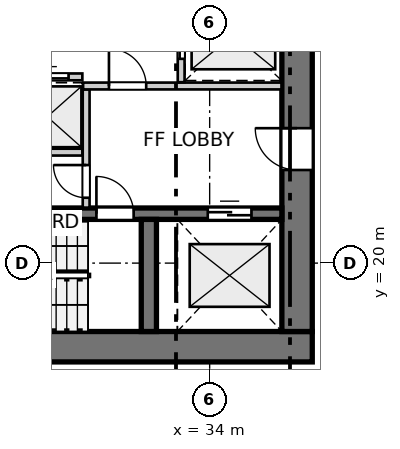
"""IFC4 building model, lengths in metres.
Left out: names, types, materials, properties, quantities, classifications, styles, units other than length and angle.
Written with IfcOpenShell. Run it as: python <this file> out.ifc"""

import sys

from ifc_helpers import new_model, si_unit, direction, frame, frame_2d, origin, place, context, subcontext, project, spatial, rectangle, extrude, source, transform, mapped, element, fill, save


model = new_model("IFC4")
c1 = context("Model", 3, precision=1e-05, world=origin(), true_north=direction((0.0, 1.0)))
c2 = subcontext(c1, "Body", "Model", "MODEL_VIEW")
j1 = project(units=[si_unit("LENGTHUNIT", "METRE"), si_unit("PLANEANGLEUNIT", "RADIAN")], contexts=[c1])
p1 = place(None, origin())
s1 = spatial("IfcSite", under=j1, at=p1, CompositionType="ELEMENT")
p2 = place(p1, origin())
s2 = spatial("IfcBuilding", under=s1, at=p2, CompositionType="ELEMENT")
p3 = place(p2, frame((0.0, 0.0, 27.0)))
s3 = spatial("IfcBuildingStorey", under=s2, at=p3, CompositionType="ELEMENT", Elevation=27.0)
p4 = place(p3, frame((24.0, 17.8, 0.0), z_axis=(0.0, 0.0, 1.0), x_axis=(1.0, 0.0, 0.0)))
e1 = element("IfcWall", 1, at=p4, inside=s3, PredefinedType="SHEAR", context=c2, shape_type="SweptSolid", body=[
    extrude(rectangle(XDim=12.7, YDim=0.8, at=frame_2d((6.35, 0.0))), origin(), (0.0, 0.0, 1.0), 2.935),
])
p5 = place(p3, frame((36.3, 18.2, 0.0), z_axis=(0.0, 0.0, 1.0), x_axis=(0.0, 1.0, 0.0)))
e2 = element("IfcWall", 2, at=p5, inside=s3, PredefinedType="SHEAR", context=c2, shape_type="SweptSolid", body=[
    extrude(rectangle(XDim=15.6, YDim=0.8, at=frame_2d((7.8, 0.0))), origin(), (0.0, 0.0, 1.0), 2.935),
])
p6 = place(p5, frame((4.25, 0.0, 0.0)))
e3 = element("IfcOpeningElement", 3, at=p6, cuts=e2, PredefinedType="OPENING", context=c2, shape_type="SweptSolid", body=[
    extrude(rectangle(XDim=1.1, YDim=2.15, at=frame_2d((0.55, 1.075))), frame((0.0, 0.41, 0.0), z_axis=(0.0, -1.0, 0.0), x_axis=(1.0, 0.0, 0.0)), (0.0, 0.0, 1.0), 0.82),
])
p7 = place(p5, frame((10.25, 0.0, 0.0)))
e4 = element("IfcOpeningElement", 4, at=p7, cuts=e2, PredefinedType="OPENING", context=c2, shape_type="SweptSolid", body=[
    extrude(rectangle(XDim=1.1, YDim=2.15, at=frame_2d((0.55, 1.075))), frame((0.0, 0.41, 0.0), z_axis=(0.0, -1.0, 0.0), x_axis=(1.0, 0.0, 0.0)), (0.0, 0.0, 1.0), 0.82),
])
p8 = place(p3, frame((24.8, 21.3, 0.0), z_axis=(0.0, 0.0, 1.0), x_axis=(1.0, 0.0, 0.0)))
e5 = element("IfcWall", 5, at=p8, inside=s3, PredefinedType="SHEAR", context=c2, shape_type="SweptSolid", body=[
    extrude(rectangle(XDim=11.1, YDim=0.3, at=frame_2d((5.55, 0.0))), origin(), (0.0, 0.0, 1.0), 2.935),
])
p9 = place(p8, frame((6.22, 0.0, 0.0)))
e6 = element("IfcOpeningElement", 6, at=p9, cuts=e5, PredefinedType="OPENING", context=c2, shape_type="SweptSolid", body=[
    extrude(rectangle(XDim=0.98, YDim=2.15, at=frame_2d((0.49, 1.075))), frame((0.0, 0.16, 0.0), z_axis=(0.0, -1.0, 0.0), x_axis=(1.0, 0.0, 0.0)), (0.0, 0.0, 1.0), 0.32),
])
p10 = place(p8, frame((9.15, 0.0, 0.0)))
e7 = element("IfcOpeningElement", 7, at=p10, cuts=e5, PredefinedType="OPENING", context=c2, shape_type="SweptSolid", body=[
    extrude(rectangle(XDim=1.15, YDim=2.15, at=frame_2d((0.575, 1.075))), frame((0.0, 0.16, 0.0), z_axis=(0.0, -1.0, 0.0), x_axis=(1.0, 0.0, 0.0)), (0.0, 0.0, 1.0), 0.32),
])
p11 = place(p3, frame((32.4, 18.2, 0.0), z_axis=(0.0, 0.0, 1.0), x_axis=(0.0, 1.0, 0.0)))
e8 = element("IfcWall", 8, at=p11, inside=s3, PredefinedType="SHEAR", context=c2, shape_type="SweptSolid", body=[
    extrude(rectangle(XDim=2.95, YDim=0.4, at=frame_2d((1.475, 0.0))), origin(), (0.0, 0.0, 1.0), 2.935),
])
p12 = place(p3, frame((30.75, 21.46, 0.0), z_axis=(0.0, 0.0, 1.0), x_axis=(0.0, 1.0, 0.0)))
e9 = element("IfcWall", 9, at=p12, inside=s3, PredefinedType="PARTITIONING", context=c2, shape_type="SweptSolid", body=[
    extrude(rectangle(XDim=3.11, YDim=0.18, at=frame_2d((1.555, 0.0))), origin(), (0.0, 0.0, 1.0), 2.935),
])
p13 = place(p12, frame((0.26, 0.0, 0.0)))
e10 = element("IfcOpeningElement", 10, at=p13, cuts=e9, PredefinedType="OPENING", context=c2, shape_type="SweptSolid", body=[
    extrude(rectangle(XDim=0.86, YDim=2.05, at=frame_2d((0.43, 1.025))), frame((0.0, 0.1, 0.0), z_axis=(0.0, -1.0, 0.0), x_axis=(1.0, 0.0, 0.0)), (0.0, 0.0, 1.0), 0.2),
])
p14 = place(p3, frame((30.67, 24.66, 0.0), z_axis=(0.0, 0.0, 1.0), x_axis=(1.0, 0.0, 0.0)))
e11 = element("IfcWall", 11, at=p14, inside=s3, PredefinedType="PARTITIONING", context=c2, shape_type="SweptSolid", body=[
    extrude(rectangle(XDim=5.22, YDim=0.18, at=frame_2d((2.61, 0.0))), origin(), (0.0, 0.0, 1.0), 2.935),
])
p15 = place(p14, frame((0.68, 0.0, 0.0)))
e12 = element("IfcOpeningElement", 12, at=p15, cuts=e11, PredefinedType="OPENING", context=c2, shape_type="SweptSolid", body=[
    extrude(rectangle(XDim=0.98, YDim=2.15, at=frame_2d((0.49, 1.075))), frame((0.0, 0.1, 0.0), z_axis=(0.0, -1.0, 0.0), x_axis=(1.0, 0.0, 0.0)), (0.0, 0.0, 1.0), 0.2),
])
p16 = place(p3, frame((33.25, 24.76, 0.0), z_axis=(0.0, 0.0, 1.0), x_axis=(0.0, 1.0, 0.0)))
e13 = element("IfcWall", 13, at=p16, inside=s3, PredefinedType="PARTITIONING", context=c2, shape_type="SweptSolid", body=[
    extrude(rectangle(XDim=2.48, YDim=0.18, at=frame_2d((1.24, 0.0))), origin(), (0.0, 0.0, 1.0), 2.935),
])
p17 = place(p16, frame((0.615, 0.0, 0.0)))
e14 = element("IfcOpeningElement", 14, at=p17, cuts=e13, PredefinedType="OPENING", context=c2, shape_type="SweptSolid", body=[
    extrude(rectangle(XDim=1.25, YDim=2.15, at=frame_2d((0.625, 1.075))), frame((0.0, 0.1, 0.0), z_axis=(0.0, -1.0, 0.0), x_axis=(1.0, 0.0, 0.0)), (0.0, 0.0, 1.0), 0.2),
])
p18 = place(p3, frame((24.81, 22.92, 0.0), z_axis=(0.0, 0.0, 1.0), x_axis=(1.0, 0.0, 0.0)))
e15 = element("IfcWall", 15, at=p18, inside=s3, PredefinedType="PARTITIONING", context=c2, shape_type="SweptSolid", body=[
    extrude(rectangle(XDim=5.84, YDim=0.18, at=frame_2d((2.92, 0.0))), origin(), (0.0, 0.0, 1.0), 2.935),
])
p19 = place(p3, frame((28.825, 24.9, 0.0), z_axis=(0.0, 0.0, 1.0), x_axis=(1.0, 0.0, 0.0)))
e16 = element("IfcWall", 16, at=p19, inside=s3, PredefinedType="PARTITIONING", context=c2, shape_type="SweptSolid", body=[
    extrude(rectangle(XDim=1.825, YDim=0.18, at=frame_2d((0.913, 0.0))), origin(), (0.0, 0.0, 1.0), 2.935),
])
p20 = place(p19, frame((0.363, 0.0, 0.0)))
e17 = element("IfcOpeningElement", 17, at=p20, cuts=e16, PredefinedType="OPENING", context=c2, shape_type="SweptSolid", body=[
    extrude(rectangle(XDim=1.1, YDim=2.15, at=frame_2d((0.55, 1.075))), frame((0.0, 0.1, 0.0), z_axis=(0.0, -1.0, 0.0), x_axis=(1.0, 0.0, 0.0)), (0.0, 0.0, 1.0), 0.2),
])
m1 = source(origin(), c2, "Body", "SweptSolid", [
    extrude(rectangle(XDim=0.98, YDim=2.15, at=frame_2d((0.49, 1.075))), frame((0.0, 0.025, 0.0), z_axis=(0.0, -1.0, 0.0), x_axis=(1.0, 0.0, 0.0)), (0.0, 0.0, 1.0), 0.05),
])
p21 = place(p9, origin())
e18 = element("IfcDoor", 18, at=p21, inside=s3, OperationType="SINGLE_SWING_LEFT", PredefinedType="DOOR", context=c2, shape_type="MappedRepresentation", body=[
    mapped(m1, transform((0.0, 0.0, 0.0), x_axis=(1.0, 0.0, 0.0), y_axis=(0.0, 1.0, 0.0), z_axis=(0.0, 0.0, 1.0), scale=1.0)),
])
fill(e6, e18)
m2 = source(origin(), c2, "Body", "SweptSolid", [
    extrude(rectangle(XDim=1.15, YDim=2.15, at=frame_2d((0.575, 1.075))), frame((0.0, 0.025, 0.0), z_axis=(0.0, -1.0, 0.0), x_axis=(1.0, 0.0, 0.0)), (0.0, 0.0, 1.0), 0.05),
])
p22 = place(p10, origin())
e19 = element("IfcDoor", 19, at=p22, inside=s3, OperationType="DOUBLE_DOOR_SLIDING", PredefinedType="DOOR", context=c2, shape_type="MappedRepresentation", body=[
    mapped(m2, transform((0.0, 0.0, 0.0), x_axis=(1.0, 0.0, 0.0), y_axis=(0.0, 1.0, 0.0), z_axis=(0.0, 0.0, 1.0), scale=1.0)),
])
fill(e7, e19)
m3 = source(origin(), c2, "Body", "SweptSolid", [
    extrude(rectangle(XDim=1.1, YDim=2.15, at=frame_2d((0.55, 1.075))), frame((0.0, 0.025, 0.0), z_axis=(0.0, -1.0, 0.0), x_axis=(1.0, 0.0, 0.0)), (0.0, 0.0, 1.0), 0.05),
])
p23 = place(p6, origin())
e20 = element("IfcDoor", 20, at=p23, inside=s3, OperationType="SINGLE_SWING_RIGHT", PredefinedType="DOOR", context=c2, shape_type="MappedRepresentation", body=[
    mapped(m3, transform((0.0, 0.0, 0.0), x_axis=(1.0, 0.0, 0.0), y_axis=(0.0, 1.0, 0.0), z_axis=(0.0, 0.0, 1.0), scale=1.0)),
])
fill(e3, e20)
m4 = source(origin(), c2, "Body", "SweptSolid", [
    extrude(rectangle(XDim=0.86, YDim=2.05, at=frame_2d((0.43, 1.025))), frame((0.0, 0.025, 0.0), z_axis=(0.0, -1.0, 0.0), x_axis=(1.0, 0.0, 0.0)), (0.0, 0.0, 1.0), 0.05),
])
p24 = place(p13, origin())
e21 = element("IfcDoor", 21, at=p24, inside=s3, OperationType="SINGLE_SWING_RIGHT", PredefinedType="DOOR", context=c2, shape_type="MappedRepresentation", body=[
    mapped(m4, transform((0.0, 0.0, 0.0), x_axis=(1.0, 0.0, 0.0), y_axis=(0.0, 1.0, 0.0), z_axis=(0.0, 0.0, 1.0), scale=1.0)),
])
fill(e10, e21)
p25 = place(p15, origin())
e22 = element("IfcDoor", 22, at=p25, inside=s3, OperationType="SINGLE_SWING_LEFT", PredefinedType="DOOR", context=c2, shape_type="MappedRepresentation", body=[
    mapped(m1, transform((0.0, 0.0, 0.0), x_axis=(1.0, 0.0, 0.0), y_axis=(0.0, 1.0, 0.0), z_axis=(0.0, 0.0, 1.0), scale=1.0)),
])
fill(e12, e22)
m5 = source(origin(), c2, "Body", "SweptSolid", [
    extrude(rectangle(XDim=1.25, YDim=2.15, at=frame_2d((0.625, 1.075))), frame((0.0, 0.025, 0.0), z_axis=(0.0, -1.0, 0.0), x_axis=(1.0, 0.0, 0.0)), (0.0, 0.0, 1.0), 0.05),
])
p26 = place(p17, origin())
e23 = element("IfcDoor", 23, at=p26, inside=s3, OperationType="DOUBLE_DOOR_SLIDING", PredefinedType="DOOR", context=c2, shape_type="MappedRepresentation", body=[
    mapped(m5, transform((0.0, 0.0, 0.0), x_axis=(1.0, 0.0, 0.0), y_axis=(0.0, 1.0, 0.0), z_axis=(0.0, 0.0, 1.0), scale=1.0)),
])
fill(e14, e23)
p27 = place(p20, origin())
e24 = element("IfcDoor", 24, at=p27, inside=s3, OperationType="DOUBLE_DOOR_SLIDING", PredefinedType="DOOR", context=c2, shape_type="MappedRepresentation", body=[
    mapped(m3, transform((0.0, 0.0, 0.0), x_axis=(1.0, 0.0, 0.0), y_axis=(0.0, 1.0, 0.0), z_axis=(0.0, 0.0, 1.0), scale=1.0)),
])
fill(e17, e24)
save(model, sys.argv[1])
